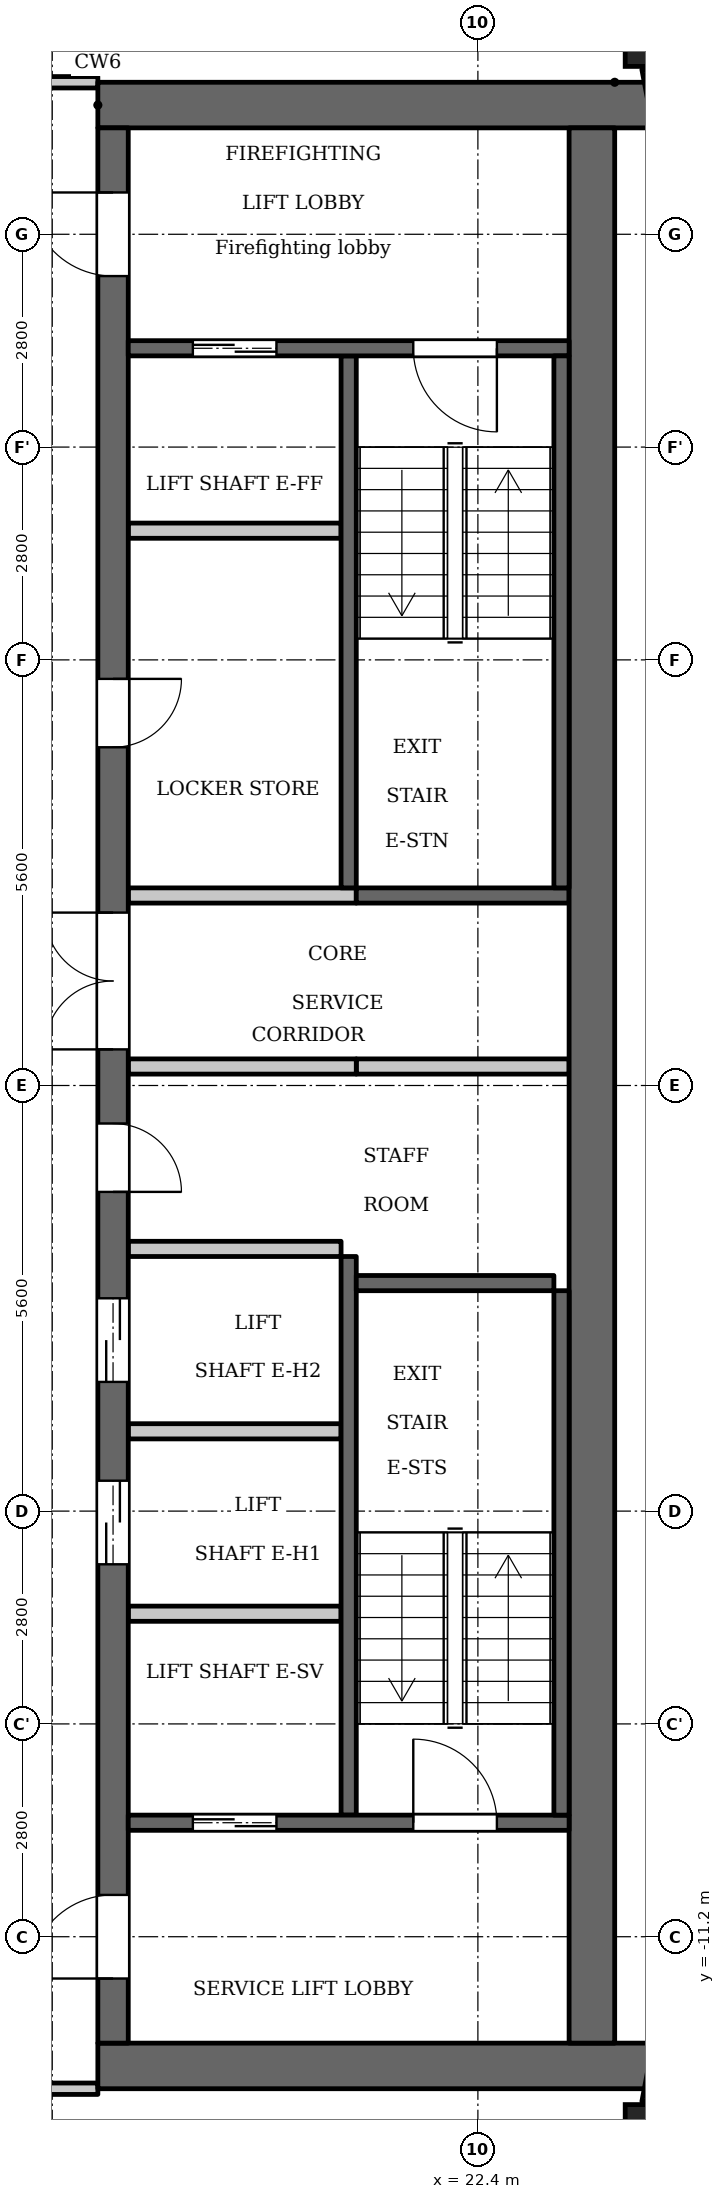
"""IFC4 building model, lengths in metres.
Left out: names, types, materials, properties, quantities, classifications, styles, units other than length and angle.
Written with IfcOpenShell. Run it as: python <this file> out.ifc"""

import sys

from ifc_helpers import new_model, si_unit, direction, frame, frame_2d, origin, origin_2d, place, context, subcontext, project, spatial, rectangle, extrude, element, fill, save


model = new_model("IFC4")
c1 = context("Model", 3, precision=1e-05, world=origin(), true_north=direction((0.0, 1.0)))
c2 = subcontext(c1, "Body", "Model", "MODEL_VIEW")
j1 = project(units=[si_unit("LENGTHUNIT", "METRE"), si_unit("PLANEANGLEUNIT", "RADIAN")], contexts=[c1])
p1 = place(None, origin())
s1 = spatial("IfcSite", under=j1, at=p1, CompositionType="ELEMENT")
p2 = place(p1, origin())
s2 = spatial("IfcBuilding", under=s1, at=p2, CompositionType="ELEMENT")
p3 = place(p2, frame((0.0, 0.0, 259.2)))
s3 = spatial("IfcBuildingStorey", under=s2, at=p3, CompositionType="ELEMENT", Elevation=259.2)
for number, where, z_axis, x_axis in (
    (1, (24.738, -13.809, 0.0), (0.0, 0.0, 1.0), (1.0, 0.0, 0.0)),
    (2, (24.738, 13.809, 0.0), (0.0, 0.0, 1.0), (1.0, 0.0, 0.0)),
):
    element("IfcColumn", number, at=place(p3, frame(where, z_axis=z_axis, x_axis=x_axis)), inside=s3, PredefinedType="COLUMN", context=c2, shape_type="SweptSolid", body=[
        extrude(rectangle(XDim=0.8, YDim=0.8, at=origin_2d()), origin(), (0.0, 0.0, 1.0), 3.5),
    ])
for number, where, z_axis, x_axis in (
    (3, (24.705, -13.395, 0.0), (0.0, 0.0, 1.0), (0.187, 0.982, 0.0)),
    (4, (25.053, 11.572, 0.0), (0.0, 0.0, 1.0), (-0.187, 0.982, 0.0)),
):
    element("IfcWall", number, at=place(p3, frame(where, z_axis=z_axis, x_axis=x_axis)), inside=s3, PredefinedType="SOLIDWALL", context=c2, shape_type="SweptSolid", body=[
        extrude(rectangle(XDim=1.856, YDim=0.3, at=frame_2d((0.928, 0.0))), origin(), (0.0, 0.0, 1.0), 2.55),
    ])
p4 = place(p3, frame((20.7, 2.6, 0.0), z_axis=(0.0, 0.0, 1.0), x_axis=(0.0, 1.0, 0.0)))
e5 = element("IfcWall", 5, at=p4, inside=s3, PredefinedType="SHEAR", context=c2, shape_type="SweptSolid", body=[
    extrude(rectangle(XDim=7.0, YDim=0.2, at=frame_2d((3.5, 0.0))), origin(), (0.0, 0.0, 1.0), 3.2),
])
p5 = place(p3, frame((20.7, -9.6, 0.0), z_axis=(0.0, 0.0, 1.0), x_axis=(0.0, 1.0, 0.0)))
e6 = element("IfcWall", 6, at=p5, inside=s3, PredefinedType="SHEAR", context=c2, shape_type="SweptSolid", body=[
    extrude(rectangle(XDim=7.35, YDim=0.2, at=frame_2d((3.675, 0.0))), origin(), (0.0, 0.0, 1.0), 3.2),
])
p6 = place(p3, frame((20.8, 2.5, 0.0), z_axis=(0.0, 0.0, 1.0), x_axis=(1.0, 0.0, 0.0)))
e7 = element("IfcWall", 7, at=p6, inside=s3, PredefinedType="SHEAR", context=c2, shape_type="SweptSolid", body=[
    extrude(rectangle(XDim=2.8, YDim=0.2, at=frame_2d((1.4, 0.0))), origin(), (0.0, 0.0, 1.0), 3.2),
])
p7 = place(p3, frame((20.8, 0.25, 0.0), z_axis=(0.0, 0.0, 1.0), x_axis=(1.0, 0.0, 0.0)))
e8 = element("IfcWall", 8, at=p7, inside=s3, PredefinedType="PARTITIONING", context=c2, shape_type="SweptSolid", body=[
    extrude(rectangle(XDim=2.8, YDim=0.2, at=frame_2d((1.4, 0.0))), origin(), (0.0, 0.0, 1.0), 3.2),
])
for number, where, z_axis, x_axis in (
    (9, (17.4, 12.9, 0.0), (0.0, 0.0, 1.0), (1.0, 0.0, 0.0)),
    (10, (17.4, -12.9, 0.0), (0.0, 0.0, 1.0), (1.0, 0.0, 0.0)),
):
    element("IfcWall", number, at=place(p3, frame(where, z_axis=z_axis, x_axis=x_axis)), inside=s3, PredefinedType="SHEAR", context=c2, shape_type="SweptSolid", body=[
        extrude(rectangle(XDim=7.32, YDim=0.6, at=frame_2d((3.66, 0.0))), origin(), (0.0, 0.0, 1.0), 3.2),
    ])
p8 = place(p3, frame((17.6, -12.6, 0.0), z_axis=(0.0, 0.0, 1.0), x_axis=(0.0, 1.0, 0.0)))
e11 = element("IfcWall", 11, at=p8, inside=s3, PredefinedType="SHEAR", context=c2, shape_type="SweptSolid", body=[
    extrude(rectangle(XDim=25.2, YDim=0.4, at=frame_2d((12.6, 0.0))), origin(), (0.0, 0.0, 1.0), 3.2),
])
p9 = place(p8, frame((6.3, 0.0, 0.0)))
e12 = element("IfcOpeningElement", 12, at=p9, cuts=e11, PredefinedType="OPENING", context=c2, shape_type="SweptSolid", body=[
    extrude(rectangle(XDim=1.1, YDim=2.1, at=frame_2d((0.55, 1.05))), frame((0.0, 0.21, 0.0), z_axis=(0.0, -1.0, 0.0), x_axis=(1.0, 0.0, 0.0)), (0.0, 0.0, 1.0), 0.42),
])
p10 = place(p8, frame((8.7, 0.0, 0.0)))
e13 = element("IfcOpeningElement", 13, at=p10, cuts=e11, PredefinedType="OPENING", context=c2, shape_type="SweptSolid", body=[
    extrude(rectangle(XDim=1.1, YDim=2.1, at=frame_2d((0.55, 1.05))), frame((0.0, 0.21, 0.0), z_axis=(0.0, -1.0, 0.0), x_axis=(1.0, 0.0, 0.0)), (0.0, 0.0, 1.0), 0.42),
])
p11 = place(p8, frame((11.2, 0.0, 0.0)))
e14 = element("IfcOpeningElement", 14, at=p11, cuts=e11, PredefinedType="OPENING", context=c2, shape_type="SweptSolid", body=[
    extrude(rectangle(XDim=0.9, YDim=2.1, at=frame_2d((0.45, 1.05))), frame((0.0, 0.21, 0.0), z_axis=(0.0, -1.0, 0.0), x_axis=(1.0, 0.0, 0.0)), (0.0, 0.0, 1.0), 0.42),
])
p12 = place(p8, frame((17.05, 0.0, 0.0)))
e15 = element("IfcOpeningElement", 15, at=p12, cuts=e11, PredefinedType="OPENING", context=c2, shape_type="SweptSolid", body=[
    extrude(rectangle(XDim=0.9, YDim=2.1, at=frame_2d((0.45, 1.05))), frame((0.0, 0.21, 0.0), z_axis=(0.0, -1.0, 0.0), x_axis=(1.0, 0.0, 0.0)), (0.0, 0.0, 1.0), 0.42),
])
p13 = place(p8, frame((23.25, 0.0, 0.0)))
e16 = element("IfcOpeningElement", 16, at=p13, cuts=e11, PredefinedType="OPENING", context=c2, shape_type="SweptSolid", body=[
    extrude(rectangle(XDim=1.1, YDim=2.1, at=frame_2d((0.55, 1.05))), frame((0.0, 0.21, 0.0), z_axis=(0.0, -1.0, 0.0), x_axis=(1.0, 0.0, 0.0)), (0.0, 0.0, 1.0), 0.42),
])
p14 = place(p8, frame((0.85, 0.0, 0.0)))
e17 = element("IfcOpeningElement", 17, at=p14, cuts=e11, PredefinedType="OPENING", context=c2, shape_type="SweptSolid", body=[
    extrude(rectangle(XDim=1.1, YDim=2.1, at=frame_2d((0.55, 1.05))), frame((0.0, 0.21, 0.0), z_axis=(0.0, -1.0, 0.0), x_axis=(1.0, 0.0, 0.0)), (0.0, 0.0, 1.0), 0.42),
])
p15 = place(p8, frame((13.075, 0.0, 0.0)))
e18 = element("IfcOpeningElement", 18, at=p15, cuts=e11, PredefinedType="OPENING", context=c2, shape_type="SweptSolid", body=[
    extrude(rectangle(XDim=1.8, YDim=2.1, at=frame_2d((0.9, 1.05))), frame((0.0, 0.21, 0.0), z_axis=(0.0, -1.0, 0.0), x_axis=(1.0, 0.0, 0.0)), (0.0, 0.0, 1.0), 0.42),
])
p16 = place(p3, frame((23.9, -12.6, 0.0), z_axis=(0.0, 0.0, 1.0), x_axis=(0.0, 1.0, 0.0)))
e19 = element("IfcWall", 19, at=p16, inside=s3, PredefinedType="SHEAR", context=c2, shape_type="SweptSolid", body=[
    extrude(rectangle(XDim=25.2, YDim=0.6, at=frame_2d((12.6, 0.0))), origin(), (0.0, 0.0, 1.0), 3.2),
])
p17 = place(p3, frame((17.8, -9.7, 0.0), z_axis=(0.0, 0.0, 1.0), x_axis=(1.0, 0.0, 0.0)))
e20 = element("IfcWall", 20, at=p17, inside=s3, PredefinedType="SHEAR", context=c2, shape_type="SweptSolid", body=[
    extrude(rectangle(XDim=5.8, YDim=0.2, at=frame_2d((2.9, 0.0))), origin(), (0.0, 0.0, 1.0), 3.2),
])
p18 = place(p17, frame((0.85, 0.0, 0.0)))
e21 = element("IfcOpeningElement", 21, at=p18, cuts=e20, PredefinedType="OPENING", context=c2, shape_type="SweptSolid", body=[
    extrude(rectangle(XDim=1.1, YDim=2.1, at=frame_2d((0.55, 1.05))), frame((0.0, 0.11, 0.0), z_axis=(0.0, -1.0, 0.0), x_axis=(1.0, 0.0, 0.0)), (0.0, 0.0, 1.0), 0.22),
])
p19 = place(p17, frame((3.75, 0.0, 0.0)))
e22 = element("IfcOpeningElement", 22, at=p19, cuts=e20, PredefinedType="OPENING", context=c2, shape_type="SweptSolid", body=[
    extrude(rectangle(XDim=1.1, YDim=2.1, at=frame_2d((0.55, 1.05))), frame((0.0, 0.11, 0.0), z_axis=(0.0, -1.0, 0.0), x_axis=(1.0, 0.0, 0.0)), (0.0, 0.0, 1.0), 0.22),
])
for number, where, z_axis, x_axis in (
    (23, (17.8, -6.95, 0.0), (0.0, 0.0, 1.0), (1.0, 0.0, 0.0)),
    (24, (17.8, -4.55, 0.0), (0.0, 0.0, 1.0), (1.0, 0.0, 0.0)),
    (25, (17.8, -2.15, 0.0), (0.0, 0.0, 1.0), (1.0, 0.0, 0.0)),
):
    element("IfcWall", number, at=place(p3, frame(where, z_axis=z_axis, x_axis=x_axis)), inside=s3, PredefinedType="PARTITIONING", context=c2, shape_type="SweptSolid", body=[
        extrude(rectangle(XDim=2.8, YDim=0.2, at=frame_2d((1.4, 0.0))), origin(), (0.0, 0.0, 1.0), 3.2),
    ])
for number, where, z_axis, x_axis in (
    (26, (17.8, 0.25, 0.0), (0.0, 0.0, 1.0), (1.0, 0.0, 0.0)),
    (27, (17.8, 2.5, 0.0), (0.0, 0.0, 1.0), (1.0, 0.0, 0.0)),
):
    element("IfcWall", number, at=place(p3, frame(where, z_axis=z_axis, x_axis=x_axis)), inside=s3, PredefinedType="PARTITIONING", context=c2, shape_type="SweptSolid", body=[
        extrude(rectangle(XDim=3.0, YDim=0.2, at=frame_2d((1.5, 0.0))), origin(), (0.0, 0.0, 1.0), 3.2),
    ])
p20 = place(p3, frame((17.8, 7.3, 0.0), z_axis=(0.0, 0.0, 1.0), x_axis=(1.0, 0.0, 0.0)))
e28 = element("IfcWall", 28, at=p20, inside=s3, PredefinedType="PARTITIONING", context=c2, shape_type="SweptSolid", body=[
    extrude(rectangle(XDim=2.8, YDim=0.2, at=frame_2d((1.4, 0.0))), origin(), (0.0, 0.0, 1.0), 3.2),
])
p21 = place(p3, frame((17.8, 9.7, 0.0), z_axis=(0.0, 0.0, 1.0), x_axis=(1.0, 0.0, 0.0)))
e29 = element("IfcWall", 29, at=p21, inside=s3, PredefinedType="SHEAR", context=c2, shape_type="SweptSolid", body=[
    extrude(rectangle(XDim=5.8, YDim=0.2, at=frame_2d((2.9, 0.0))), origin(), (0.0, 0.0, 1.0), 3.2),
])
p22 = place(p21, frame((0.85, 0.0, 0.0)))
e30 = element("IfcOpeningElement", 30, at=p22, cuts=e29, PredefinedType="OPENING", context=c2, shape_type="SweptSolid", body=[
    extrude(rectangle(XDim=1.1, YDim=2.1, at=frame_2d((0.55, 1.05))), frame((0.0, 0.11, 0.0), z_axis=(0.0, -1.0, 0.0), x_axis=(1.0, 0.0, 0.0)), (0.0, 0.0, 1.0), 0.22),
])
p23 = place(p21, frame((3.75, 0.0, 0.0)))
e31 = element("IfcOpeningElement", 31, at=p23, cuts=e29, PredefinedType="OPENING", context=c2, shape_type="SweptSolid", body=[
    extrude(rectangle(XDim=1.1, YDim=2.1, at=frame_2d((0.55, 1.05))), frame((0.0, 0.11, 0.0), z_axis=(0.0, -1.0, 0.0), x_axis=(1.0, 0.0, 0.0)), (0.0, 0.0, 1.0), 0.22),
])
p24 = place(p3, frame((23.5, 2.6, 0.0), z_axis=(0.0, 0.0, 1.0), x_axis=(0.0, 1.0, 0.0)))
e32 = element("IfcWall", 32, at=p24, inside=s3, PredefinedType="SHEAR", context=c2, shape_type="SweptSolid", body=[
    extrude(rectangle(XDim=7.0, YDim=0.2, at=frame_2d((3.5, 0.0))), origin(), (0.0, 0.0, 1.0), 3.2),
])
p25 = place(p3, frame((23.5, -9.6, 0.0), z_axis=(0.0, 0.0, 1.0), x_axis=(0.0, 1.0, 0.0)))
e33 = element("IfcWall", 33, at=p25, inside=s3, PredefinedType="SHEAR", context=c2, shape_type="SweptSolid", body=[
    extrude(rectangle(XDim=6.9, YDim=0.2, at=frame_2d((3.45, 0.0))), origin(), (0.0, 0.0, 1.0), 3.2),
])
p26 = place(p3, frame((20.8, -2.6, 0.0), z_axis=(0.0, 0.0, 1.0), x_axis=(1.0, 0.0, 0.0)))
e34 = element("IfcWall", 34, at=p26, inside=s3, PredefinedType="SHEAR", context=c2, shape_type="SweptSolid", body=[
    extrude(rectangle(XDim=2.6, YDim=0.2, at=frame_2d((1.3, 0.0))), origin(), (0.0, 0.0, 1.0), 3.2),
])
p27 = place(p3, frame((15.075, -13.2, 0.0), z_axis=(0.0, 0.0, 1.0), x_axis=(1.0, 0.0, 0.0)))
e35 = element("IfcWall", 35, at=p27, inside=s3, PredefinedType="PARTITIONING", context=c2, shape_type="SweptSolid", body=[
    extrude(rectangle(XDim=2.325, YDim=0.15, at=frame_2d((1.163, 0.0))), origin(), (0.0, 0.0, 1.0), 3.2),
])
p28 = place(p27, frame((0.575, 0.0, 0.0)))
e36 = element("IfcOpeningElement", 36, at=p28, cuts=e35, PredefinedType="OPENING", context=c2, shape_type="SweptSolid", body=[
    extrude(rectangle(XDim=1.0, YDim=2.1, at=frame_2d((0.5, 1.05))), frame((0.0, 0.085, 0.0), z_axis=(0.0, -1.0, 0.0), x_axis=(1.0, 0.0, 0.0)), (0.0, 0.0, 1.0), 0.17),
])
p29 = place(p3, frame((15.075, 13.2, 0.0), z_axis=(0.0, 0.0, 1.0), x_axis=(1.0, 0.0, 0.0)))
e37 = element("IfcWall", 37, at=p29, inside=s3, PredefinedType="PARTITIONING", context=c2, shape_type="SweptSolid", body=[
    extrude(rectangle(XDim=2.325, YDim=0.15, at=frame_2d((1.163, 0.0))), origin(), (0.0, 0.0, 1.0), 3.2),
])
p30 = place(p29, frame((0.675, 0.0, 0.0)))
e38 = element("IfcOpeningElement", 38, at=p30, cuts=e37, PredefinedType="OPENING", context=c2, shape_type="SweptSolid", body=[
    extrude(rectangle(XDim=1.0, YDim=2.1, at=frame_2d((0.5, 1.05))), frame((0.0, 0.085, 0.0), z_axis=(0.0, -1.0, 0.0), x_axis=(1.0, 0.0, 0.0)), (0.0, 0.0, 1.0), 0.17),
])
p31 = place(p18, origin())
e39 = element("IfcDoor", 39, at=p31, inside=s3, OperationType="DOUBLE_DOOR_SLIDING", PredefinedType="DOOR", context=c2, shape_type="SweptSolid", body=[
    extrude(rectangle(XDim=1.1, YDim=2.1, at=frame_2d((0.55, 1.05))), frame((0.0, 0.025, 0.0), z_axis=(0.0, -1.0, 0.0), x_axis=(1.0, 0.0, 0.0)), (0.0, 0.0, 1.0), 0.05),
])
fill(e21, e39)
p32 = place(p9, origin())
e40 = element("IfcDoor", 40, at=p32, inside=s3, OperationType="DOUBLE_DOOR_SLIDING", PredefinedType="DOOR", context=c2, shape_type="SweptSolid", body=[
    extrude(rectangle(XDim=1.1, YDim=2.1, at=frame_2d((0.55, 1.05))), frame((0.0, 0.025, 0.0), z_axis=(0.0, -1.0, 0.0), x_axis=(1.0, 0.0, 0.0)), (0.0, 0.0, 1.0), 0.05),
])
fill(e12, e40)
p33 = place(p10, origin())
e41 = element("IfcDoor", 41, at=p33, inside=s3, OperationType="DOUBLE_DOOR_SLIDING", PredefinedType="DOOR", context=c2, shape_type="SweptSolid", body=[
    extrude(rectangle(XDim=1.1, YDim=2.1, at=frame_2d((0.55, 1.05))), frame((0.0, 0.025, 0.0), z_axis=(0.0, -1.0, 0.0), x_axis=(1.0, 0.0, 0.0)), (0.0, 0.0, 1.0), 0.05),
])
fill(e13, e41)
p34 = place(p11, origin())
e42 = element("IfcDoor", 42, at=p34, inside=s3, OperationType="SINGLE_SWING_LEFT", PredefinedType="DOOR", context=c2, shape_type="SweptSolid", body=[
    extrude(rectangle(XDim=0.9, YDim=2.1, at=frame_2d((0.45, 1.05))), frame((0.0, 0.025, 0.0), z_axis=(0.0, -1.0, 0.0), x_axis=(1.0, 0.0, 0.0)), (0.0, 0.0, 1.0), 0.05),
])
fill(e14, e42)
p35 = place(p12, origin())
e43 = element("IfcDoor", 43, at=p35, inside=s3, OperationType="SINGLE_SWING_RIGHT", PredefinedType="DOOR", context=c2, shape_type="SweptSolid", body=[
    extrude(rectangle(XDim=0.9, YDim=2.1, at=frame_2d((0.45, 1.05))), frame((0.0, 0.025, 0.0), z_axis=(0.0, -1.0, 0.0), x_axis=(1.0, 0.0, 0.0)), (0.0, 0.0, 1.0), 0.05),
])
fill(e15, e43)
p36 = place(p22, origin())
e44 = element("IfcDoor", 44, at=p36, inside=s3, OperationType="DOUBLE_DOOR_SLIDING", PredefinedType="DOOR", context=c2, shape_type="SweptSolid", body=[
    extrude(rectangle(XDim=1.1, YDim=2.1, at=frame_2d((0.55, 1.05))), frame((0.0, 0.025, 0.0), z_axis=(0.0, -1.0, 0.0), x_axis=(1.0, 0.0, 0.0)), (0.0, 0.0, 1.0), 0.05),
])
fill(e30, e44)
p37 = place(p13, origin())
e45 = element("IfcDoor", 45, at=p37, inside=s3, OperationType="SINGLE_SWING_LEFT", PredefinedType="DOOR", context=c2, shape_type="SweptSolid", body=[
    extrude(rectangle(XDim=1.1, YDim=2.1, at=frame_2d((0.55, 1.05))), frame((0.0, 0.025, 0.0), z_axis=(0.0, -1.0, 0.0), x_axis=(1.0, 0.0, 0.0)), (0.0, 0.0, 1.0), 0.05),
])
fill(e16, e45)
p38 = place(p14, origin())
e46 = element("IfcDoor", 46, at=p38, inside=s3, OperationType="SINGLE_SWING_RIGHT", PredefinedType="DOOR", context=c2, shape_type="SweptSolid", body=[
    extrude(rectangle(XDim=1.1, YDim=2.1, at=frame_2d((0.55, 1.05))), frame((0.0, 0.025, 0.0), z_axis=(0.0, -1.0, 0.0), x_axis=(1.0, 0.0, 0.0)), (0.0, 0.0, 1.0), 0.05),
])
fill(e17, e46)
p39 = place(p23, origin())
e47 = element("IfcDoor", 47, at=p39, inside=s3, OperationType="SINGLE_SWING_RIGHT", PredefinedType="DOOR", context=c2, shape_type="SweptSolid", body=[
    extrude(rectangle(XDim=1.1, YDim=2.1, at=frame_2d((0.55, 1.05))), frame((0.0, 0.025, 0.0), z_axis=(0.0, -1.0, 0.0), x_axis=(1.0, 0.0, 0.0)), (0.0, 0.0, 1.0), 0.05),
])
fill(e31, e47)
p40 = place(p19, origin())
e48 = element("IfcDoor", 48, at=p40, inside=s3, OperationType="SINGLE_SWING_RIGHT", PredefinedType="DOOR", context=c2, shape_type="SweptSolid", body=[
    extrude(rectangle(XDim=1.1, YDim=2.1, at=frame_2d((0.55, 1.05))), frame((0.0, 0.025, 0.0), z_axis=(0.0, -1.0, 0.0), x_axis=(1.0, 0.0, 0.0)), (0.0, 0.0, 1.0), 0.05),
])
fill(e22, e48)
p41 = place(p15, origin())
e49 = element("IfcDoor", 49, at=p41, inside=s3, OperationType="DOUBLE_DOOR_SINGLE_SWING", PredefinedType="DOOR", context=c2, shape_type="SweptSolid", body=[
    extrude(rectangle(XDim=1.8, YDim=2.1, at=frame_2d((0.9, 1.05))), frame((0.0, 0.025, 0.0), z_axis=(0.0, -1.0, 0.0), x_axis=(1.0, 0.0, 0.0)), (0.0, 0.0, 1.0), 0.05),
])
fill(e18, e49)
save(model, sys.argv[1])
